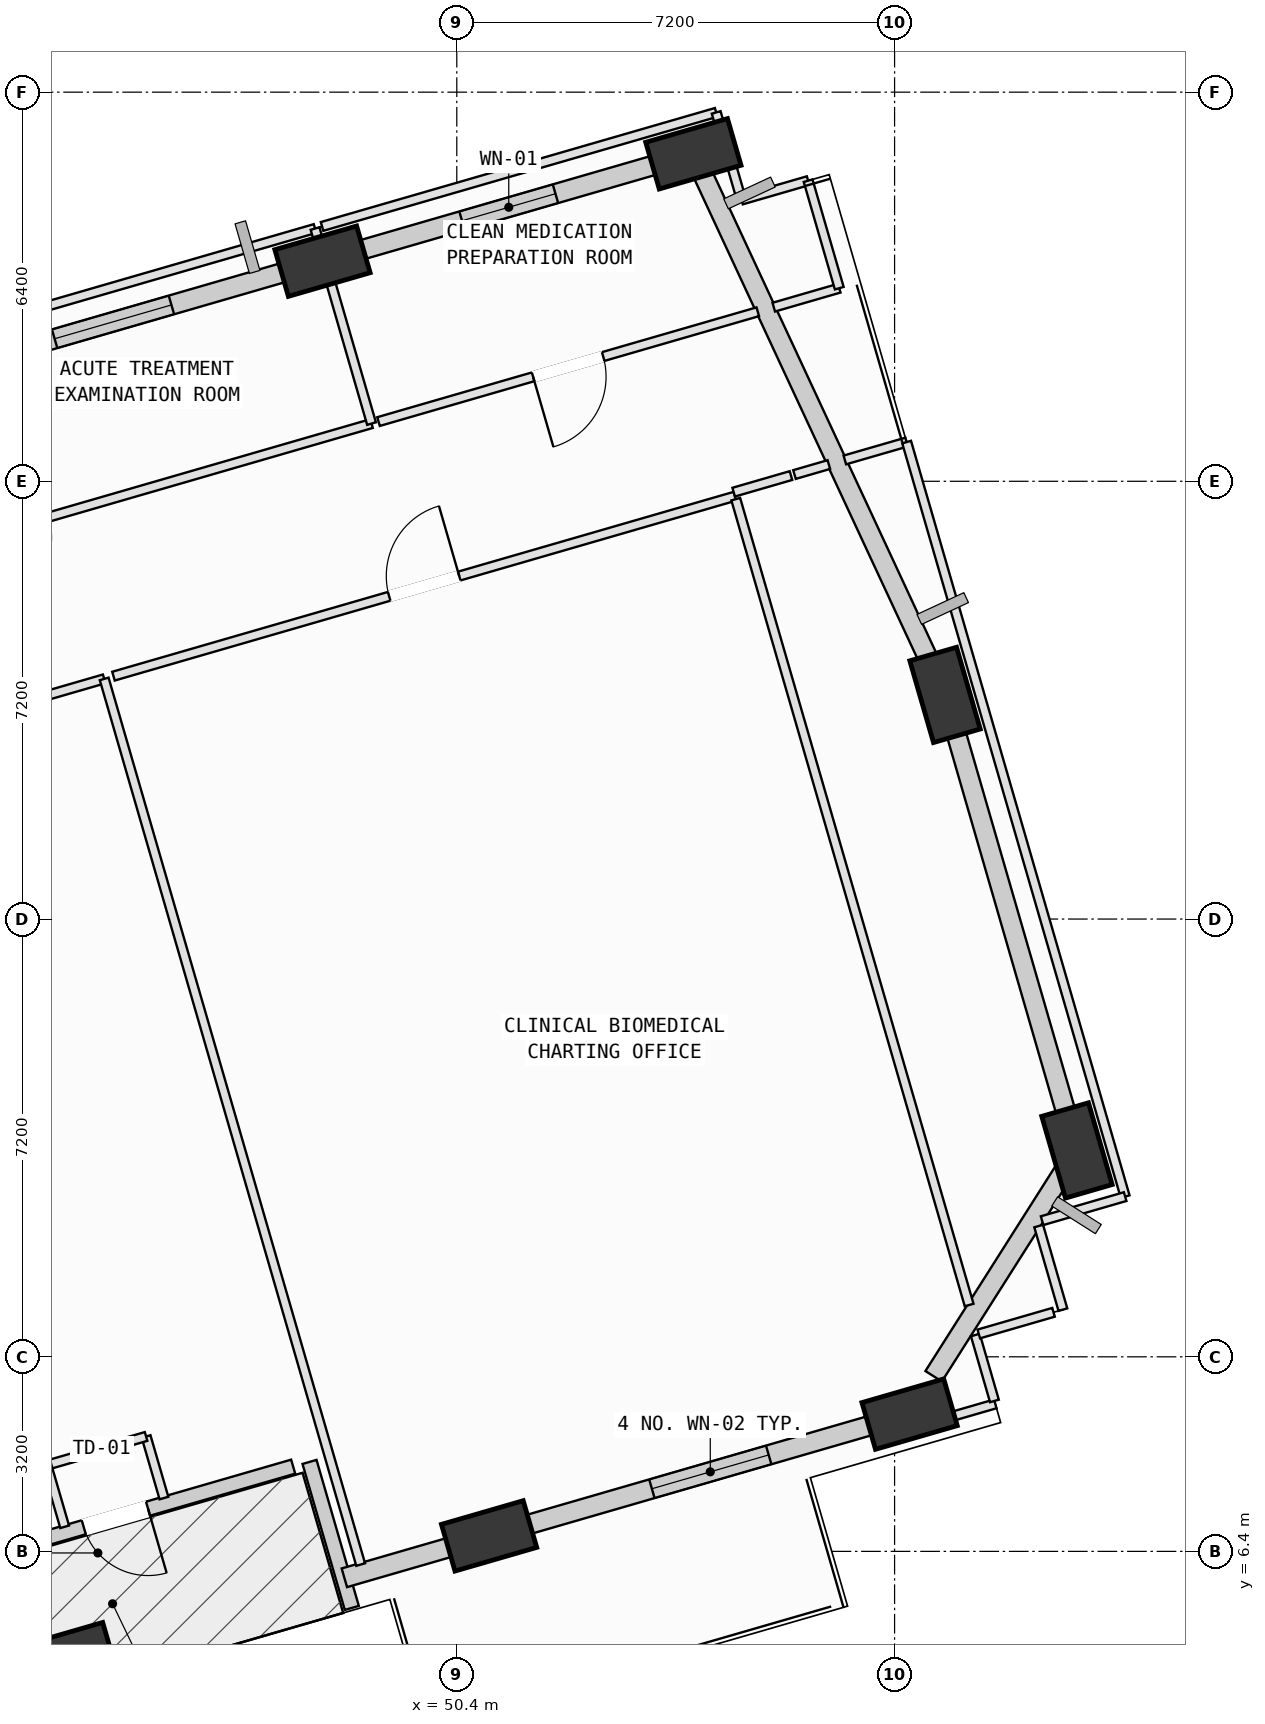
"""IFC4 building model, lengths in metres.
Left out: names, types, materials, properties, quantities, classifications, styles, units other than length and angle.
Written with IfcOpenShell. Run it as: python <this file> out.ifc"""

import sys

from ifc_helpers import new_model, si_unit, direction, frame, frame_2d, origin, origin_2d, place, context, subcontext, project, spatial, rectangle, extrude, element, fill, save


model = new_model("IFC4")
c1 = context("Model", 3, precision=1e-05, world=origin(), true_north=direction((0.0, 1.0)))
c2 = subcontext(c1, "Body", "Model", "MODEL_VIEW")
j1 = project(units=[si_unit("LENGTHUNIT", "METRE"), si_unit("PLANEANGLEUNIT", "RADIAN")], contexts=[c1])
p1 = place(None, origin())
s1 = spatial("IfcSite", under=j1, at=p1, CompositionType="ELEMENT")
p2 = place(p1, origin())
s2 = spatial("IfcBuilding", under=s1, at=p2, CompositionType="ELEMENT")
p3 = place(p2, frame((0.0, 0.0, 92.4)))
s3 = spatial("IfcBuildingStorey", under=s2, at=p3, CompositionType="ELEMENT", Elevation=92.4)
p4 = place(p3, frame((44.015, 4.652, 0.002), z_axis=(0.082780006749, 0.043670863222, 0.995610529368), x_axis=(-0.693126808156, 0.720345403179, 0.026033208285)))
e1 = element("IfcColumn", 1, at=p4, inside=s3, PredefinedType="COLUMN", context=c2, shape_type="SweptSolid", body=[
    extrude(rectangle(XDim=1.4, YDim=0.8, at=origin_2d()), origin(), (0.0, 0.0, 1.0), 4.014),
])
p5 = place(p3, frame((50.931, 6.655, 0.002), z_axis=(0.074252582584, 0.072065108793, 0.994632180293), x_axis=(-0.867503720891, 0.496597338829, 0.028781544571)))
e2 = element("IfcColumn", 2, at=p5, inside=s3, PredefinedType="COLUMN", context=c2, shape_type="SweptSolid", body=[
    extrude(rectangle(XDim=1.4, YDim=0.8, at=origin_2d()), origin(), (0.0, 0.0, 1.0), 4.018),
])
p6 = place(p3, frame((57.847, 8.657, 0.002), z_axis=(0.065563521642, 0.100316433669, 0.99279304881), x_axis=(-0.95511967318, 0.294338645187, 0.03333424446)))
e3 = element("IfcColumn", 3, at=p6, inside=s3, PredefinedType="COLUMN", context=c2, shape_type="SweptSolid", body=[
    extrude(rectangle(XDim=1.4, YDim=0.8, at=origin_2d()), origin(), (0.0, 0.0, 1.0), 4.025),
])
p7 = place(p3, frame((60.599, 12.994, 0.002), z_axis=(0.047663167765, 0.111517258931, 0.992618820796), x_axis=(-0.118947165952, -0.986043421986, 0.116490092582)))
e4 = element("IfcColumn", 4, at=p7, inside=s3, PredefinedType="COLUMN", context=c2, shape_type="SweptSolid", body=[
    extrude(rectangle(XDim=1.4, YDim=0.8, at=origin_2d()), origin(), (0.0, 0.0, 1.0), 4.026),
])
p8 = place(p3, frame((58.43, 20.486, 0.002), z_axis=(0.016952173008, 0.102502924246, 0.994588243622), x_axis=(0.118546591366, -0.987920856836, 0.099795221852)))
e5 = element("IfcColumn", 5, at=p8, inside=s3, PredefinedType="COLUMN", context=c2, shape_type="SweptSolid", body=[
    extrude(rectangle(XDim=1.4, YDim=0.8, at=origin_2d()), origin(), (0.0, 0.0, 1.0), 4.018),
])
p9 = place(p3, frame((54.291, 29.386, 0.002), z_axis=(-0.019656743005, 0.085260362073, 0.996164787128), x_axis=(-0.87373443972, -0.48579400269, 0.024337538869)))
e6 = element("IfcColumn", 6, at=p9, inside=s3, PredefinedType="COLUMN", context=c2, shape_type="SweptSolid", body=[
    extrude(rectangle(XDim=1.4, YDim=0.8, at=origin_2d()), origin(), (0.0, 0.0, 1.0), 4.012),
])
p10 = place(p3, frame((48.191, 27.62, 0.002), z_axis=(-0.012134148462, 0.060243912966, 0.998109930514), x_axis=(-0.886808387337, -0.461821063456, 0.017093551324)))
e7 = element("IfcColumn", 7, at=p10, inside=s3, PredefinedType="COLUMN", context=c2, shape_type="SweptSolid", body=[
    extrude(rectangle(XDim=1.4, YDim=0.8, at=origin_2d()), origin(), (0.0, 0.0, 1.0), 4.004),
])
p11 = place(p3, frame((47.709, 7.793, 0.0), z_axis=(0.0, 0.0, 1.0), x_axis=(-0.960532946144, -0.278166244127, 0.0)))
e8 = element("IfcWall", 8, at=p11, inside=s3, PredefinedType="SOLIDWALL", context=c2, shape_type="SweptSolid", body=[
    extrude(rectangle(XDim=6.96, YDim=0.24, at=frame_2d((3.48, 0.0))), origin(), (0.0, 0.0, 1.0), 3.165),
])
p12 = place(p11, frame((2.485, 0.0, 0.0)))
e9 = element("IfcOpeningElement", 9, at=p12, cuts=e8, PredefinedType="OPENING", context=c2, shape_type="SweptSolid", body=[
    extrude(rectangle(XDim=1.1, YDim=2.15, at=frame_2d((0.55, 1.075))), frame((0.0, 0.13, 0.0), z_axis=(0.0, -1.0, 0.0), x_axis=(1.0, 0.0, 0.0)), (0.0, 0.0, 1.0), 0.26),
])
p13 = place(p3, frame((48.674, 5.47, 0.0), z_axis=(0.0, 0.0, 1.0), x_axis=(-0.27812446952, 0.960545042907, 0.0)))
e10 = element("IfcWall", 10, at=p13, inside=s3, PredefinedType="SOLIDWALL", context=c2, shape_type="SweptSolid", body=[
    extrude(rectangle(XDim=2.5, YDim=0.24, at=frame_2d((1.25, 0.0))), origin(), (0.0, 0.0, 1.0), 3.165),
])
p14 = place(p3, frame((50.64, 6.57, 0.0), z_axis=(0.0, 0.0, 1.0), x_axis=(-0.960543750342, -0.278128933553, 0.0)))
e11 = element("IfcWall", 11, at=p14, inside=s3, PredefinedType="SOLIDWALL", context=c2, shape_type="SweptSolid", body=[
    extrude(rectangle(XDim=2.175, YDim=0.32, at=frame_2d((1.088, 0.0))), origin(), (0.0, 0.0, 1.0), 3.145),
])
p15 = place(p3, frame((57.571, 8.577, 0.0), z_axis=(0.0, 0.0, 1.0), x_axis=(-0.96053484433, -0.278159689437, 0.0)))
e12 = element("IfcWall", 12, at=p15, inside=s3, PredefinedType="SOLIDWALL", context=c2, shape_type="SweptSolid", body=[
    extrude(rectangle(XDim=6.242, YDim=0.32, at=frame_2d((3.121, 0.0))), origin(), (0.0, 0.0, 1.0), 3.145),
])
p16 = place(p15, frame((2.125, 0.0, 0.75)))
e13 = element("IfcOpeningElement", 13, at=p16, cuts=e12, PredefinedType="OPENING", context=c2, shape_type="SweptSolid", body=[
    extrude(rectangle(XDim=2.0, YDim=1.95, at=frame_2d((1.0, 0.975))), frame((0.0, 0.17, 0.0), z_axis=(0.0, -1.0, 0.0), x_axis=(1.0, 0.0, 0.0)), (0.0, 0.0, 1.0), 0.34),
])
p17 = place(p3, frame((60.463, 12.78, 0.0), z_axis=(0.0, 0.0, 1.0), x_axis=(-0.535857545401, -0.844308409905, 0.0)))
e14 = element("IfcWall", 14, at=p17, inside=s3, PredefinedType="SOLIDWALL", context=c2, shape_type="SweptSolid", body=[
    extrude(rectangle(XDim=4.145, YDim=0.32, at=frame_2d((2.073, 0.0))), origin(), (0.0, 0.0, 1.0), 3.165),
])
p18 = place(p3, frame((58.513, 20.198, 0.0), z_axis=(0.0, 0.0, 1.0), x_axis=(0.278156008639, -0.960535910239, 0.0)))
e15 = element("IfcWall", 15, at=p18, inside=s3, PredefinedType="SOLIDWALL", context=c2, shape_type="SweptSolid", body=[
    extrude(rectangle(XDim=6.84, YDim=0.32, at=frame_2d((3.42, 0.0))), origin(), (0.0, 0.0, 1.0), 3.165),
])
p19 = place(p3, frame((54.427, 29.093, 0.0), z_axis=(0.0, 0.0, 1.0), x_axis=(0.421696417701, -0.906737079477, 0.0)))
e16 = element("IfcWall", 16, at=p19, inside=s3, PredefinedType="SOLIDWALL", context=c2, shape_type="SweptSolid", body=[
    extrude(rectangle(XDim=8.838, YDim=0.32, at=frame_2d((4.419, 0.0))), origin(), (0.0, 0.0, 1.0), 3.165),
])
p20 = place(p3, frame((48.663, 27.757, 0.0), z_axis=(0.0, 0.0, 1.0), x_axis=(0.960541082189, 0.278138148099, 0.0)))
e17 = element("IfcWall", 17, at=p20, inside=s3, PredefinedType="SOLIDWALL", context=c2, shape_type="SweptSolid", body=[
    extrude(rectangle(XDim=5.404, YDim=0.32, at=frame_2d((2.702, 0.0))), origin(), (0.0, 0.0, 1.0), 2.965),
])
p21 = place(p20, frame((1.898, 0.0, 0.75)))
e18 = element("IfcOpeningElement", 18, at=p21, cuts=e17, PredefinedType="OPENING", context=c2, shape_type="SweptSolid", body=[
    extrude(rectangle(XDim=1.6, YDim=1.95, at=frame_2d((0.8, 0.975))), frame((0.0, 0.17, 0.0), z_axis=(0.0, -1.0, 0.0), x_axis=(1.0, 0.0, 0.0)), (0.0, 0.0, 1.0), 0.34),
])
p22 = place(p3, frame((41.759, 25.757, 0.0), z_axis=(0.0, 0.0, 1.0), x_axis=(0.960538354847, 0.278147566711, 0.0)))
e19 = element("IfcWall", 19, at=p22, inside=s3, PredefinedType="SOLIDWALL", context=c2, shape_type="SweptSolid", body=[
    extrude(rectangle(XDim=6.227, YDim=0.32, at=frame_2d((3.113, 0.0))), origin(), (0.0, 0.0, 1.0), 3.165),
])
p23 = place(p22, frame((2.111, 0.0, 0.75)))
e20 = element("IfcOpeningElement", 20, at=p23, cuts=e19, PredefinedType="OPENING", context=c2, shape_type="SweptSolid", body=[
    extrude(rectangle(XDim=2.0, YDim=1.95, at=frame_2d((1.0, 0.975))), frame((0.0, 0.17, 0.0), z_axis=(0.0, -1.0, 0.0), x_axis=(1.0, 0.0, 0.0)), (0.0, 0.0, 1.0), 0.34),
])
p24 = place(p3, frame((38.03, 18.847, 0.0), z_axis=(0.0, 0.0, 1.0), x_axis=(0.960527884636, 0.278183721372, 0.0)))
e21 = element("IfcWall", 21, at=p24, inside=s3, PredefinedType="PARTITIONING", context=c2, shape_type="SweptSolid", body=[
    extrude(rectangle(XDim=6.841, YDim=0.15, at=frame_2d((3.42, 0.0))), origin(), (0.0, 0.0, 1.0), 2.965),
])
p25 = place(p24, frame((2.821, 0.0, 0.0)))
e22 = element("IfcOpeningElement", 22, at=p25, cuts=e21, PredefinedType="OPENING", context=c2, shape_type="SweptSolid", body=[
    extrude(rectangle(XDim=1.2, YDim=2.15, at=frame_2d((0.6, 1.075))), frame((0.0, 0.085, 0.0), z_axis=(0.0, -1.0, 0.0), x_axis=(1.0, 0.0, 0.0)), (0.0, 0.0, 1.0), 0.17),
])
p26 = place(p3, frame((44.601, 20.75, 0.0), z_axis=(0.0, 0.0, 1.0), x_axis=(0.278136254334, -0.960541630553, 0.0)))
e23 = element("IfcWall", 23, at=p26, inside=s3, PredefinedType="PARTITIONING", context=c2, shape_type="SweptSolid", body=[
    extrude(rectangle(XDim=15.165, YDim=0.15, at=frame_2d((7.583, 0.0))), origin(), (0.0, 0.0, 1.0), 3.78),
])
p27 = place(p3, frame((45.584, 7.277, 0.0), z_axis=(0.0, 0.0, 1.0), x_axis=(-0.278693123589, 0.960380207451, 0.0)))
e24 = element("IfcWall", 24, at=p27, inside=s3, PredefinedType="PARTITIONING", context=c2, shape_type="SweptSolid", body=[
    extrude(rectangle(XDim=1.055, YDim=0.15, at=frame_2d((0.527, 0.0))), origin(), (0.0, 0.0, 1.0), 3.78),
])
p28 = place(p3, frame((45.29, 8.29, 0.0), z_axis=(0.0, 0.0, 1.0), x_axis=(-0.960498634142, -0.278284699203, 0.0)))
e25 = element("IfcWall", 25, at=p28, inside=s3, PredefinedType="PARTITIONING", context=c2, shape_type="SweptSolid", body=[
    extrude(rectangle(XDim=1.7, YDim=0.15, at=frame_2d((0.85, 0.0))), origin(), (0.0, 0.0, 1.0), 3.78),
])
p29 = place(p3, frame((43.657, 7.817, 0.0), z_axis=(0.0, 0.0, 1.0), x_axis=(0.278693123589, -0.960380207451, 0.0)))
e26 = element("IfcWall", 26, at=p29, inside=s3, PredefinedType="PARTITIONING", context=c2, shape_type="SweptSolid", body=[
    extrude(rectangle(XDim=1.055, YDim=0.15, at=frame_2d((0.527, 0.0))), origin(), (0.0, 0.0, 1.0), 3.78),
])
p30 = place(p3, frame((59.256, 8.826, 0.0), z_axis=(0.0, 0.0, 1.0), x_axis=(-0.960452351456, -0.278444394059, 0.0)))
e27 = element("IfcWall", 27, at=p30, inside=s3, PredefinedType="PARTITIONING", context=c2, shape_type="SweptSolid", body=[
    extrude(rectangle(XDim=1.688, YDim=0.15, at=frame_2d((0.844, 0.0))), origin(), (0.0, 0.0, 1.0), 3.78),
])
p31 = place(p3, frame((51.639, 6.62, 0.0), z_axis=(0.0, 0.0, 1.0), x_axis=(-0.960456645001, -0.27842958369, 0.0)))
e28 = element("IfcWall", 28, at=p31, inside=s3, PredefinedType="PARTITIONING", context=c2, shape_type="SweptSolid", body=[
    extrude(rectangle(XDim=0.973, YDim=0.15, at=frame_2d((0.487, 0.0))), origin(), (0.0, 0.0, 1.0), 3.145),
])
p32 = place(p3, frame((44.754, 20.795, 0.0), z_axis=(0.0, 0.0, 1.0), x_axis=(0.960551683632, 0.278101533745, 0.0)))
e29 = element("IfcWall", 29, at=p32, inside=s3, PredefinedType="PARTITIONING", context=c2, shape_type="SweptSolid", body=[
    extrude(rectangle(XDim=10.64, YDim=0.15, at=frame_2d((5.32, 0.0))), origin(), (0.0, 0.0, 1.0), 3.78),
])
p33 = place(p32, frame((4.72, 0.0, 0.0)))
e30 = element("IfcOpeningElement", 30, at=p33, cuts=e29, PredefinedType="OPENING", context=c2, shape_type="SweptSolid", body=[
    extrude(rectangle(XDim=1.2, YDim=2.15, at=frame_2d((0.6, 1.075))), frame((0.0, 0.085, 0.0), z_axis=(0.0, -1.0, 0.0), x_axis=(1.0, 0.0, 0.0)), (0.0, 0.0, 1.0), 0.17),
])
p34 = place(p3, frame((54.988, 23.706, 0.0), z_axis=(0.0, 0.0, 1.0), x_axis=(0.278135834911, -0.960541752002, 0.0)))
e31 = element("IfcWall", 31, at=p34, inside=s3, PredefinedType="PARTITIONING", context=c2, shape_type="SweptSolid", body=[
    extrude(rectangle(XDim=13.799, YDim=0.15, at=frame_2d((6.899, 0.0))), origin(), (0.0, 0.0, 1.0), 3.78),
])
p35 = place(p3, frame((58.928, 9.959, 0.0), z_axis=(0.0, 0.0, 1.0), x_axis=(0.277974099978, -0.960588569441, 0.0)))
e32 = element("IfcWall", 32, at=p35, inside=s3, PredefinedType="PARTITIONING", context=c2, shape_type="SweptSolid", body=[
    extrude(rectangle(XDim=1.129, YDim=0.15, at=frame_2d((0.565, 0.0))), origin(), (0.0, 0.0, 1.0), 3.78),
])
p36 = place(p3, frame((48.998, 24.949, 0.0), z_axis=(0.0, 0.0, 1.0), x_axis=(-0.960536816253, -0.278152879948, 0.0)))
e33 = element("IfcWall", 33, at=p36, inside=s3, PredefinedType="PARTITIONING", context=c2, shape_type="SweptSolid", body=[
    extrude(rectangle(XDim=12.256, YDim=0.15, at=frame_2d((6.128, 0.0))), origin(), (0.0, 0.0, 1.0), 2.965),
])
p37 = place(p36, frame((5.528, 0.0, 0.0)))
e34 = element("IfcOpeningElement", 34, at=p37, cuts=e33, PredefinedType="OPENING", context=c2, shape_type="SweptSolid", body=[
    extrude(rectangle(XDim=1.2, YDim=2.15, at=frame_2d((0.6, 1.075))), frame((0.0, 0.085, 0.0), z_axis=(0.0, -1.0, 0.0), x_axis=(1.0, 0.0, 0.0)), (0.0, 0.0, 1.0), 0.17),
])
p38 = place(p3, frame((36.297, 24.748, 0.0), z_axis=(0.0, 0.0, 1.0), x_axis=(0.960536816253, 0.278152879948, 0.0)))
e35 = element("IfcWall", 35, at=p38, inside=s3, PredefinedType="PARTITIONING", context=c2, shape_type="SweptSolid", body=[
    extrude(rectangle(XDim=12.256, YDim=0.15, at=frame_2d((6.128, 0.0))), origin(), (0.0, 0.0, 1.0), 3.165),
])
p39 = place(p3, frame((48.069, 28.157, 0.0), z_axis=(0.0, 0.0, 1.0), x_axis=(0.27814682338, -0.960538570097, 0.0)))
e36 = element("IfcWall", 36, at=p39, inside=s3, PredefinedType="PARTITIONING", context=c2, shape_type="SweptSolid", body=[
    extrude(rectangle(XDim=3.34, YDim=0.15, at=frame_2d((1.67, 0.0))), origin(), (0.0, 0.0, 1.0), 3.78),
])
p40 = place(p3, frame((56.69, 27.176, 0.0), z_axis=(0.0, 0.0, 1.0), x_axis=(-0.960498425311, -0.278285419984, 0.0)))
e37 = element("IfcWall", 37, at=p40, inside=s3, PredefinedType="PARTITIONING", context=c2, shape_type="SweptSolid", body=[
    extrude(rectangle(XDim=1.121, YDim=0.15, at=frame_2d((0.561, 0.0))), origin(), (0.0, 0.0, 1.0), 3.78),
])
p41 = place(p3, frame((55.35, 26.788, 0.0), z_axis=(0.0, 0.0, 1.0), x_axis=(-0.960535982283, -0.278155759852, 0.0)))
e38 = element("IfcWall", 38, at=p41, inside=s3, PredefinedType="PARTITIONING", context=c2, shape_type="SweptSolid", body=[
    extrude(rectangle(XDim=6.493, YDim=0.15, at=frame_2d((3.247, 0.0))), origin(), (0.0, 0.0, 1.0), 3.78),
])
p42 = place(p41, frame((2.646, 0.0, 0.0)))
e39 = element("IfcOpeningElement", 39, at=p42, cuts=e38, PredefinedType="OPENING", context=c2, shape_type="SweptSolid", body=[
    extrude(rectangle(XDim=1.2, YDim=2.15, at=frame_2d((0.6, 1.075))), frame((0.0, 0.085, 0.0), z_axis=(0.0, -1.0, 0.0), x_axis=(1.0, 0.0, 0.0)), (0.0, 0.0, 1.0), 0.17),
])
p43 = place(p3, frame((48.184, 28.191, 0.0), z_axis=(0.0, 0.0, 1.0), x_axis=(0.960579012482, 0.278007123612, 0.0)))
e40 = element("IfcWall", 40, at=p43, inside=s3, PredefinedType="PARTITIONING", context=c2, shape_type="SweptSolid", body=[
    extrude(rectangle(XDim=6.748, YDim=0.15, at=frame_2d((3.374, 0.0))), origin(), (0.0, 0.0, 1.0), 2.965),
])
p44 = place(p3, frame((54.666, 30.067, 0.0), z_axis=(0.0, 0.0, 1.0), x_axis=(0.278160888604, -0.960534497065, 0.0)))
e41 = element("IfcWall", 41, at=p44, inside=s3, PredefinedType="PARTITIONING", context=c2, shape_type="SweptSolid", body=[
    extrude(rectangle(XDim=1.499, YDim=0.15, at=frame_2d((0.75, 0.0))), origin(), (0.0, 0.0, 1.0), 3.165),
])
p45 = place(p3, frame((55.083, 28.627, 0.0), z_axis=(0.0, 0.0, 1.0), x_axis=(0.960523610971, 0.278198477291, 0.0)))
e42 = element("IfcWall", 42, at=p45, inside=s3, PredefinedType="PARTITIONING", context=c2, shape_type="SweptSolid", body=[
    extrude(rectangle(XDim=1.14, YDim=0.15, at=frame_2d((0.57, 0.0))), origin(), (0.0, 0.0, 1.0), 3.78),
])
p46 = place(p3, frame((56.178, 28.944, 0.0), z_axis=(0.0, 0.0, 1.0), x_axis=(0.278135368306, -0.960541887112, 0.0)))
e43 = element("IfcWall", 43, at=p46, inside=s3, PredefinedType="PARTITIONING", context=c2, shape_type="SweptSolid", body=[
    extrude(rectangle(XDim=1.841, YDim=0.15, at=frame_2d((0.92, 0.0))), origin(), (0.0, 0.0, 1.0), 3.78),
])
p47 = place(p3, frame((54.954, 23.821, 0.0), z_axis=(0.0, 0.0, 1.0), x_axis=(0.960483730081, 0.278336135363, 0.0)))
e44 = element("IfcWall", 44, at=p47, inside=s3, PredefinedType="PARTITIONING", context=c2, shape_type="SweptSolid", body=[
    extrude(rectangle(XDim=0.981, YDim=0.15, at=frame_2d((0.49, 0.0))), origin(), (0.0, 0.0, 1.0), 3.78),
])
p48 = place(p3, frame((60.214, 10.332, 0.0), z_axis=(0.0, 0.0, 1.0), x_axis=(-0.960524020229, -0.278197064262, 0.0)))
e45 = element("IfcWall", 45, at=p48, inside=s3, PredefinedType="PARTITIONING", context=c2, shape_type="SweptSolid", body=[
    extrude(rectangle(XDim=1.28, YDim=0.15, at=frame_2d((0.64, 0.0))), origin(), (0.0, 0.0, 1.0), 3.78),
])
p49 = place(p3, frame((59.97, 11.751, 0.0), z_axis=(0.0, 0.0, 1.0), x_axis=(0.278008380243, -0.960578648792, 0.0)))
e46 = element("IfcWall", 46, at=p49, inside=s3, PredefinedType="PARTITIONING", context=c2, shape_type="SweptSolid", body=[
    extrude(rectangle(XDim=1.431, YDim=0.15, at=frame_2d((0.716, 0.0))), origin(), (0.0, 0.0, 1.0), 3.78),
])
p50 = place(p3, frame((55.954, 24.111, 0.0), z_axis=(0.0, 0.0, 1.0), x_axis=(0.960435800201, 0.278501478796, 0.0)))
e47 = element("IfcWall", 47, at=p50, inside=s3, PredefinedType="PARTITIONING", context=c2, shape_type="SweptSolid", body=[
    extrude(rectangle(XDim=0.588, YDim=0.15, at=frame_2d((0.294, 0.0))), origin(), (0.0, 0.0, 1.0), 3.78),
])
p51 = place(p3, frame((56.782, 24.351, 0.0), z_axis=(0.0, 0.0, 1.0), x_axis=(0.960612917975, 0.277889945517, 0.0)))
e48 = element("IfcWall", 48, at=p51, inside=s3, PredefinedType="PARTITIONING", context=c2, shape_type="SweptSolid", body=[
    extrude(rectangle(XDim=1.058, YDim=0.15, at=frame_2d((0.529, 0.0))), origin(), (0.0, 0.0, 1.0), 3.78),
])
p52 = place(p3, frame((57.798, 24.645, 0.0), z_axis=(0.0, 0.0, 1.0), x_axis=(0.278175993697, -0.960530122657, 0.0)))
e49 = element("IfcWall", 49, at=p52, inside=s3, PredefinedType="PARTITIONING", context=c2, shape_type="SweptSolid", body=[
    extrude(rectangle(XDim=12.92, YDim=0.15, at=frame_2d((6.46, 0.0))), origin(), (0.0, 0.0, 1.0), 3.165),
])
p53 = place(p3, frame((61.392, 12.235, 0.0), z_axis=(0.0, 0.0, 1.0), x_axis=(-0.960467696317, -0.278391458797, 0.0)))
e50 = element("IfcWall", 50, at=p53, inside=s3, PredefinedType="PARTITIONING", context=c2, shape_type="SweptSolid", body=[
    extrude(rectangle(XDim=1.422, YDim=0.15, at=frame_2d((0.711, 0.0))), origin(), (0.0, 0.0, 1.0), 3.78),
])
p54 = place(p12, origin())
e51 = element("IfcDoor", 51, at=p54, inside=s3, OperationType="SINGLE_SWING_LEFT", PredefinedType="DOOR", context=c2, shape_type="SweptSolid", body=[
    extrude(rectangle(XDim=1.1, YDim=2.15, at=frame_2d((0.55, 1.075))), frame((0.0, 0.025, 0.0), z_axis=(0.0, -1.0, 0.0), x_axis=(1.0, 0.0, 0.0)), (0.0, 0.0, 1.0), 0.05),
])
fill(e9, e51)
p55 = place(p16, origin())
e52 = element("IfcWindow", 52, at=p55, inside=s3, PartitioningType="SINGLE_PANEL", PredefinedType="WINDOW", context=c2, shape_type="SweptSolid", body=[
    extrude(rectangle(XDim=2.0, YDim=1.95, at=frame_2d((1.0, 0.975))), frame((0.0, 0.03, 0.0), z_axis=(0.0, -1.0, 0.0), x_axis=(1.0, 0.0, 0.0)), (0.0, 0.0, 1.0), 0.06),
])
fill(e13, e52)
p56 = place(p21, origin())
e53 = element("IfcWindow", 53, at=p56, inside=s3, PartitioningType="SINGLE_PANEL", PredefinedType="WINDOW", context=c2, shape_type="SweptSolid", body=[
    extrude(rectangle(XDim=1.6, YDim=1.95, at=frame_2d((0.8, 0.975))), frame((0.0, 0.03, 0.0), z_axis=(0.0, -1.0, 0.0), x_axis=(1.0, 0.0, 0.0)), (0.0, 0.0, 1.0), 0.06),
])
fill(e18, e53)
p57 = place(p23, origin())
e54 = element("IfcWindow", 54, at=p57, inside=s3, PartitioningType="SINGLE_PANEL", PredefinedType="WINDOW", context=c2, shape_type="SweptSolid", body=[
    extrude(rectangle(XDim=2.0, YDim=1.95, at=frame_2d((1.0, 0.975))), frame((0.0, 0.03, 0.0), z_axis=(0.0, -1.0, 0.0), x_axis=(1.0, 0.0, 0.0)), (0.0, 0.0, 1.0), 0.06),
])
fill(e20, e54)
p58 = place(p33, origin())
e55 = element("IfcDoor", 55, at=p58, inside=s3, OperationType="SINGLE_SWING_RIGHT", PredefinedType="DOOR", context=c2, shape_type="SweptSolid", body=[
    extrude(rectangle(XDim=1.2, YDim=2.15, at=frame_2d((0.6, 1.075))), frame((0.0, 0.025, 0.0), z_axis=(0.0, -1.0, 0.0), x_axis=(1.0, 0.0, 0.0)), (0.0, 0.0, 1.0), 0.05),
])
fill(e30, e55)
p59 = place(p42, origin())
e56 = element("IfcDoor", 56, at=p59, inside=s3, OperationType="SINGLE_SWING_RIGHT", PredefinedType="DOOR", context=c2, shape_type="SweptSolid", body=[
    extrude(rectangle(XDim=1.2, YDim=2.15, at=frame_2d((0.6, 1.075))), frame((0.0, 0.025, 0.0), z_axis=(0.0, -1.0, 0.0), x_axis=(1.0, 0.0, 0.0)), (0.0, 0.0, 1.0), 0.05),
])
fill(e39, e56)
save(model, sys.argv[1])
